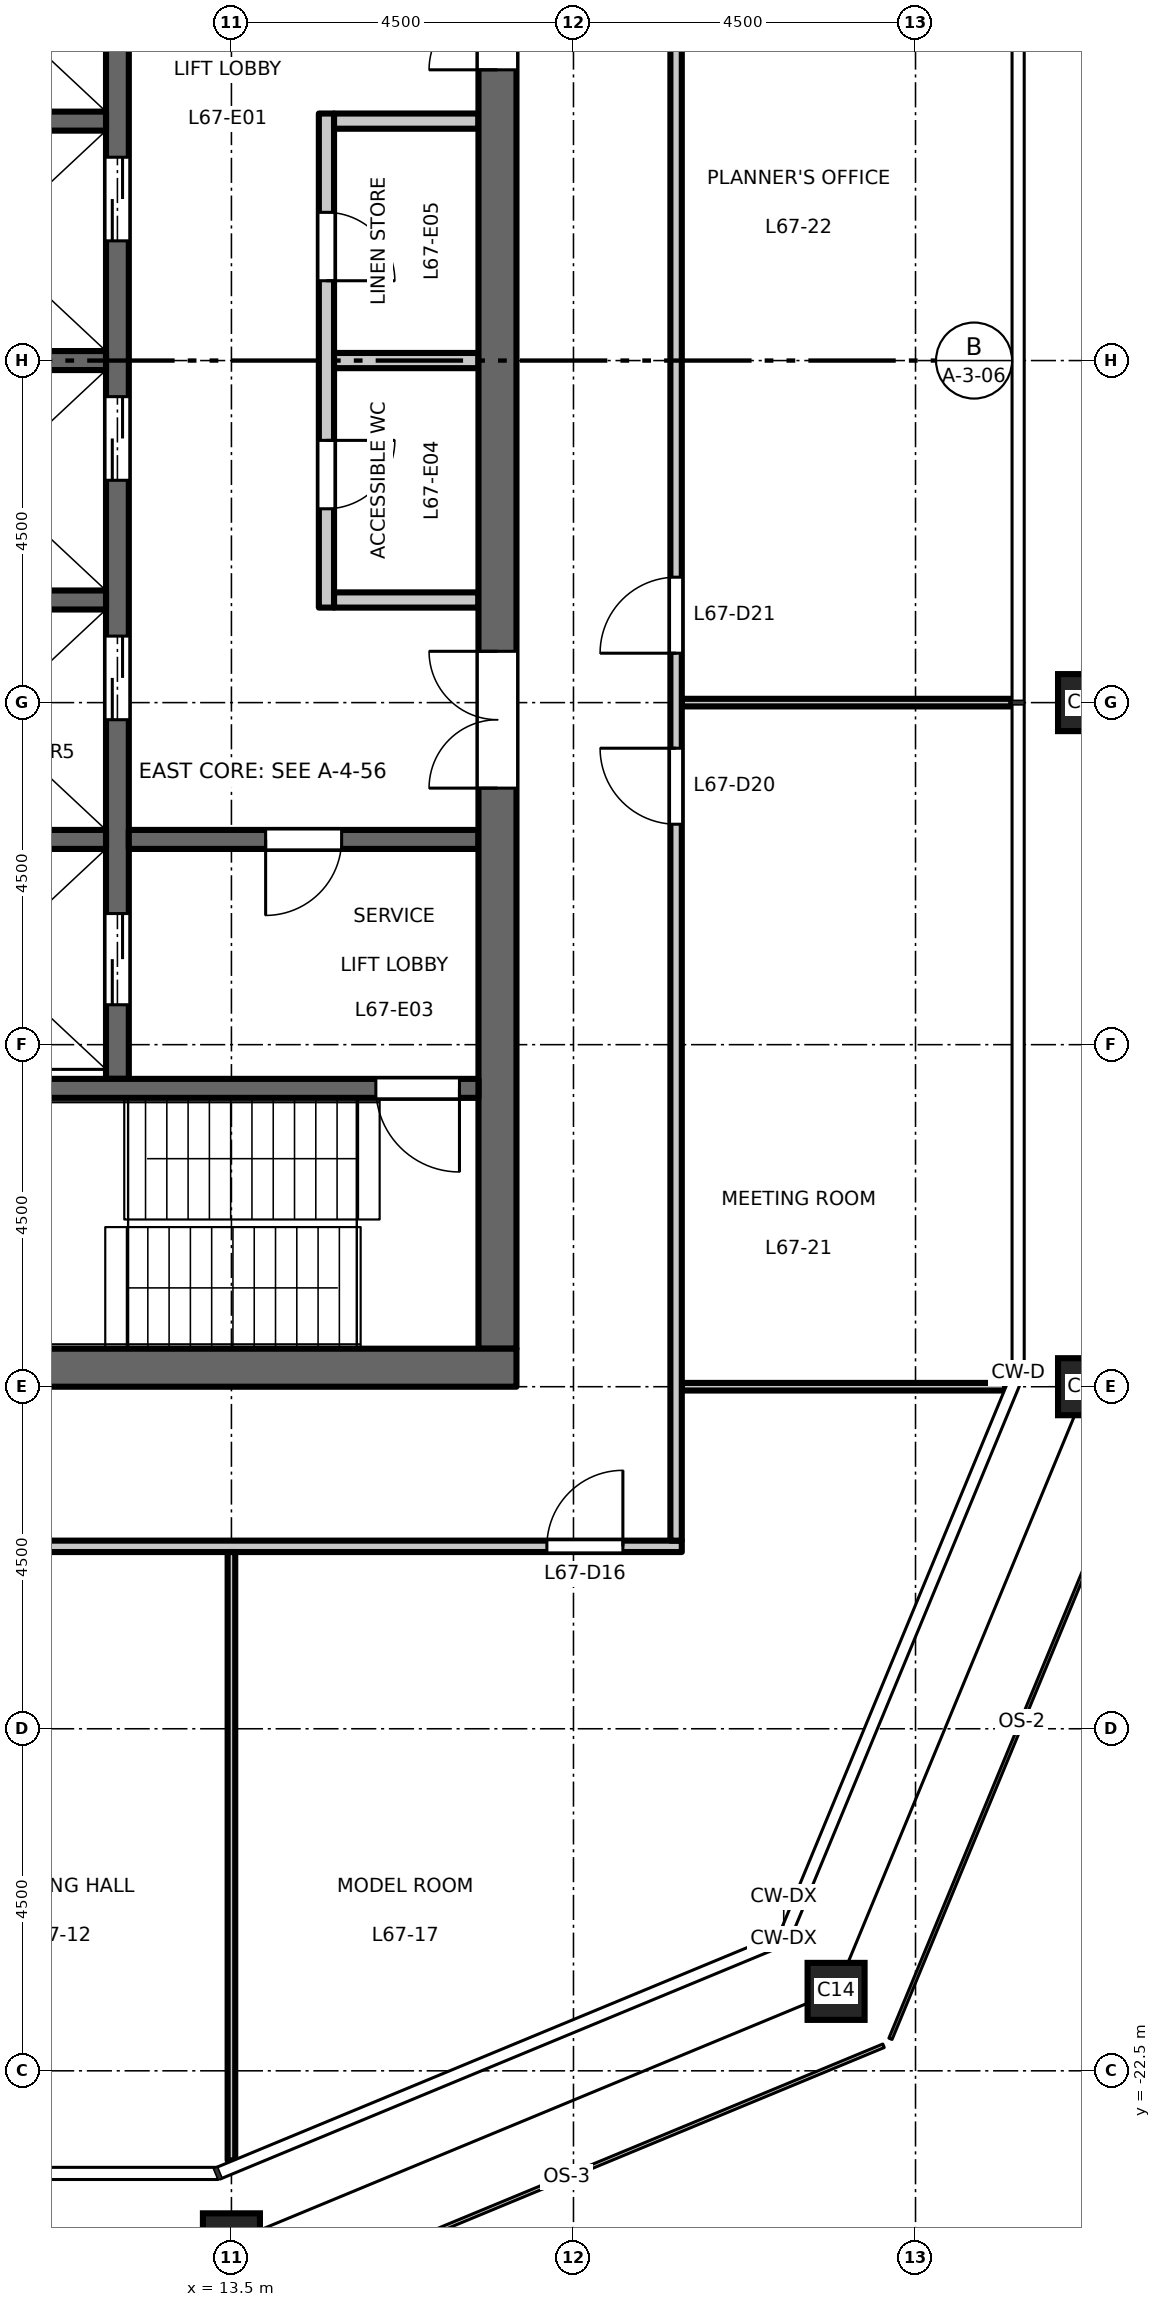
"""IFC4 building model, lengths in metres.
Left out: names, types, materials, properties, quantities, classifications, styles, units other than length and angle.
Written with IfcOpenShell. Run it as: python <this file> out.ifc"""

import sys

from ifc_helpers import new_model, si_unit, direction, frame, frame_2d, origin, origin_2d, place, context, subcontext, project, spatial, rectangle, hollow_rectangle, extrude, element, fill, save


model = new_model("IFC4")
c1 = context("Model", 3, precision=1e-05, world=origin(), true_north=direction((0.0, 1.0)))
c2 = subcontext(c1, "Body", "Model", "MODEL_VIEW")
j1 = project(units=[si_unit("LENGTHUNIT", "METRE"), si_unit("PLANEANGLEUNIT", "RADIAN")], contexts=[c1])
p1 = place(None, origin())
s1 = spatial("IfcSite", under=j1, at=p1, CompositionType="ELEMENT")
p2 = place(p1, origin())
s2 = spatial("IfcBuilding", under=s1, at=p2, CompositionType="ELEMENT")
p3 = place(p2, frame((0.0, 0.0, 312.2)))
s3 = spatial("IfcBuildingStorey", under=s2, at=p3, CompositionType="ELEMENT", Elevation=312.2)
for number, where, z_axis, x_axis in (
    (1, (13.5, -24.75, 0.0), (0.0, 0.0, 1.0), (1.0, 0.0, 0.0)),
    (2, (21.455, -21.455, 0.0), (0.0, 0.0, 1.0), (1.0, 0.0, 0.0)),
    (3, (24.75, -13.5, 0.0), (0.0, 0.0, 1.0), (1.0, 0.0, 0.0)),
    (4, (24.75, -4.5, 0.0), (0.0, 0.0, 1.0), (1.0, 0.0, 0.0)),
):
    element("IfcColumn", number, at=place(p3, frame(where, z_axis=z_axis, x_axis=x_axis)), inside=s3, PredefinedType="COLUMN", context=c2, shape_type="SweptSolid", body=[
        extrude(hollow_rectangle(XDim=0.75, YDim=0.75, WallThickness=0.04, at=origin_2d()), origin(), (0.0, 0.0, 1.0), 4.5),
    ])
p4 = place(p3, frame((14.75, -3.25, 0.0), z_axis=(0.0, 0.0, 1.0), x_axis=(0.0, 1.0, 0.0)))
e5 = element("IfcWall", 5, at=p4, inside=s3, PredefinedType="PARTITIONING", context=c2, shape_type="SweptSolid", body=[
    extrude(rectangle(XDim=6.5, YDim=0.2, at=frame_2d((3.25, 0.0))), origin(), (0.0, 0.0, 1.0), 4.35),
])
p5 = place(p4, frame((1.3, 0.0, 0.0)))
e6 = element("IfcOpeningElement", 6, at=p5, cuts=e5, PredefinedType="OPENING", context=c2, shape_type="SweptSolid", body=[
    extrude(rectangle(XDim=0.9, YDim=2.1, at=frame_2d((0.45, 1.05))), frame((0.0, 0.11, 0.0), z_axis=(0.0, -1.0, 0.0), x_axis=(1.0, 0.0, 0.0)), (0.0, 0.0, 1.0), 0.22),
])
p6 = place(p4, frame((4.3, 0.0, 0.0)))
e7 = element("IfcOpeningElement", 7, at=p6, cuts=e5, PredefinedType="OPENING", context=c2, shape_type="SweptSolid", body=[
    extrude(rectangle(XDim=0.9, YDim=2.1, at=frame_2d((0.45, 1.05))), frame((0.0, 0.11, 0.0), z_axis=(0.0, -1.0, 0.0), x_axis=(1.0, 0.0, 0.0)), (0.0, 0.0, 1.0), 0.22),
])
for number, where, z_axis, x_axis in (
    (8, (14.85, 3.15, 0.0), (0.0, 0.0, 1.0), (1.0, 0.0, 0.0)),
    (9, (14.85, -3.15, 0.0), (0.0, 0.0, 1.0), (1.0, 0.0, 0.0)),
    (10, (14.85, 0.0, 0.0), (0.0, 0.0, 1.0), (1.0, 0.0, 0.0)),
):
    element("IfcWall", number, at=place(p3, frame(where, z_axis=z_axis, x_axis=x_axis)), inside=s3, PredefinedType="PARTITIONING", context=c2, shape_type="SweptSolid", body=[
        extrude(rectangle(XDim=1.9, YDim=0.2, at=frame_2d((0.95, 0.0))), origin(), (0.0, 0.0, 1.0), 4.35),
    ])
p7 = place(p3, frame((12.0, -9.45, 0.0), z_axis=(0.0, 0.0, 1.0), x_axis=(0.0, 1.0, 0.0)))
e11 = element("IfcWall", 11, at=p7, inside=s3, PredefinedType="SHEAR", context=c2, shape_type="SweptSolid", body=[
    extrude(rectangle(XDim=18.9, YDim=0.3, at=frame_2d((9.45, 0.0))), origin(), (0.0, 0.0, 1.0), 4.35),
])
p8 = place(p7, frame((4.725, 0.0, 0.0)))
e12 = element("IfcOpeningElement", 12, at=p8, cuts=e11, PredefinedType="OPENING", context=c2, shape_type="SweptSolid", body=[
    extrude(rectangle(XDim=1.1, YDim=2.1, at=frame_2d((0.55, 1.05))), frame((0.0, 0.16, 0.0), z_axis=(0.0, -1.0, 0.0), x_axis=(1.0, 0.0, 0.0)), (0.0, 0.0, 1.0), 0.32),
])
p9 = place(p7, frame((7.875, 0.0, 0.0)))
e13 = element("IfcOpeningElement", 13, at=p9, cuts=e11, PredefinedType="OPENING", context=c2, shape_type="SweptSolid", body=[
    extrude(rectangle(XDim=1.1, YDim=2.1, at=frame_2d((0.55, 1.05))), frame((0.0, 0.16, 0.0), z_axis=(0.0, -1.0, 0.0), x_axis=(1.0, 0.0, 0.0)), (0.0, 0.0, 1.0), 0.32),
])
p10 = place(p7, frame((11.025, 0.0, 0.0)))
e14 = element("IfcOpeningElement", 14, at=p10, cuts=e11, PredefinedType="OPENING", context=c2, shape_type="SweptSolid", body=[
    extrude(rectangle(XDim=1.1, YDim=2.1, at=frame_2d((0.55, 1.05))), frame((0.0, 0.16, 0.0), z_axis=(0.0, -1.0, 0.0), x_axis=(1.0, 0.0, 0.0)), (0.0, 0.0, 1.0), 0.32),
])
p11 = place(p7, frame((14.175, 0.0, 0.0)))
e15 = element("IfcOpeningElement", 15, at=p11, cuts=e11, PredefinedType="OPENING", context=c2, shape_type="SweptSolid", body=[
    extrude(rectangle(XDim=1.1, YDim=2.1, at=frame_2d((0.55, 1.05))), frame((0.0, 0.16, 0.0), z_axis=(0.0, -1.0, 0.0), x_axis=(1.0, 0.0, 0.0)), (0.0, 0.0, 1.0), 0.32),
])
p12 = place(p7, frame((16.725, 0.0, 0.0)))
e16 = element("IfcOpeningElement", 16, at=p12, cuts=e11, PredefinedType="OPENING", context=c2, shape_type="SweptSolid", body=[
    extrude(rectangle(XDim=1.2, YDim=2.1, at=frame_2d((0.6, 1.05))), frame((0.0, 0.16, 0.0), z_axis=(0.0, -1.0, 0.0), x_axis=(1.0, 0.0, 0.0)), (0.0, 0.0, 1.0), 0.32),
])
p13 = place(p7, frame((0.975, 0.0, 0.0)))
e17 = element("IfcOpeningElement", 17, at=p13, cuts=e11, PredefinedType="OPENING", context=c2, shape_type="SweptSolid", body=[
    extrude(rectangle(XDim=1.2, YDim=2.1, at=frame_2d((0.6, 1.05))), frame((0.0, 0.16, 0.0), z_axis=(0.0, -1.0, 0.0), x_axis=(1.0, 0.0, 0.0)), (0.0, 0.0, 1.0), 0.32),
])
p14 = place(p3, frame((12.15, -6.3, 0.0), z_axis=(0.0, 0.0, 1.0), x_axis=(1.0, 0.0, 0.0)))
e18 = element("IfcWall", 18, at=p14, inside=s3, PredefinedType="SHEAR", context=c2, shape_type="SweptSolid", body=[
    extrude(rectangle(XDim=4.6, YDim=0.25, at=frame_2d((2.3, 0.0))), origin(), (0.0, 0.0, 1.0), 4.35),
])
p15 = place(p14, frame((1.8, 0.0, 0.0)))
e19 = element("IfcOpeningElement", 19, at=p15, cuts=e18, PredefinedType="OPENING", context=c2, shape_type="SweptSolid", body=[
    extrude(rectangle(XDim=1.0, YDim=2.1, at=frame_2d((0.5, 1.05))), frame((0.0, 0.135, 0.0), z_axis=(0.0, -1.0, 0.0), x_axis=(1.0, 0.0, 0.0)), (0.0, 0.0, 1.0), 0.27),
])
p16 = place(p3, frame((17.0, -13.0, 0.0), z_axis=(0.0, 0.0, 1.0), x_axis=(0.0, 1.0, 0.0)))
e20 = element("IfcWall", 20, at=p16, inside=s3, PredefinedType="SHEAR", context=c2, shape_type="SweptSolid", body=[
    extrude(rectangle(XDim=26.0, YDim=0.5, at=frame_2d((13.0, 0.0))), origin(), (0.0, 0.0, 1.0), 4.35),
])
p17 = place(p16, frame((16.825, 0.0, 0.0)))
e21 = element("IfcOpeningElement", 21, at=p17, cuts=e20, PredefinedType="OPENING", context=c2, shape_type="SweptSolid", body=[
    extrude(rectangle(XDim=1.8, YDim=2.1, at=frame_2d((0.9, 1.05))), frame((0.0, 0.26, 0.0), z_axis=(0.0, -1.0, 0.0), x_axis=(1.0, 0.0, 0.0)), (0.0, 0.0, 1.0), 0.52),
])
p18 = place(p16, frame((7.375, 0.0, 0.0)))
e22 = element("IfcOpeningElement", 22, at=p18, cuts=e20, PredefinedType="OPENING", context=c2, shape_type="SweptSolid", body=[
    extrude(rectangle(XDim=1.8, YDim=2.1, at=frame_2d((0.9, 1.05))), frame((0.0, 0.26, 0.0), z_axis=(0.0, -1.0, 0.0), x_axis=(1.0, 0.0, 0.0)), (0.0, 0.0, 1.0), 0.52),
])
for number, where, z_axis, x_axis in (
    (23, (8.75, 0.0, 0.0), (0.0, 0.0, 1.0), (1.0, 0.0, 0.0)),
    (24, (8.75, 3.15, 0.0), (0.0, 0.0, 1.0), (1.0, 0.0, 0.0)),
    (25, (8.75, -3.15, 0.0), (0.0, 0.0, 1.0), (1.0, 0.0, 0.0)),
    (26, (8.75, -6.3, 0.0), (0.0, 0.0, 1.0), (1.0, 0.0, 0.0)),
):
    element("IfcWall", number, at=place(p3, frame(where, z_axis=z_axis, x_axis=x_axis)), inside=s3, PredefinedType="SHEAR", context=c2, shape_type="SweptSolid", body=[
        extrude(rectangle(XDim=3.1, YDim=0.25, at=frame_2d((1.55, 0.0))), origin(), (0.0, 0.0, 1.0), 4.35),
    ])
p19 = place(p3, frame((8.75, -9.575, 0.0), z_axis=(0.0, 0.0, 1.0), x_axis=(1.0, 0.0, 0.0)))
e27 = element("IfcWall", 27, at=p19, inside=s3, PredefinedType="SHEAR", context=c2, shape_type="SweptSolid", body=[
    extrude(rectangle(XDim=8.0, YDim=0.25, at=frame_2d((4.0, 0.0))), origin(), (0.0, 0.0, 1.0), 4.35),
])
p20 = place(p19, frame((6.65, 0.0, 0.0)))
e28 = element("IfcOpeningElement", 28, at=p20, cuts=e27, PredefinedType="OPENING", context=c2, shape_type="SweptSolid", body=[
    extrude(rectangle(XDim=1.1, YDim=2.1, at=frame_2d((0.55, 1.05))), frame((0.0, 0.135, 0.0), z_axis=(0.0, -1.0, 0.0), x_axis=(1.0, 0.0, 0.0)), (0.0, 0.0, 1.0), 0.27),
])
p21 = place(p3, frame((8.25, -13.25, 0.0), z_axis=(0.0, 0.0, 1.0), x_axis=(1.0, 0.0, 0.0)))
e29 = element("IfcWall", 29, at=p21, inside=s3, PredefinedType="SHEAR", context=c2, shape_type="SweptSolid", body=[
    extrude(rectangle(XDim=9.0, YDim=0.5, at=frame_2d((4.5, 0.0))), origin(), (0.0, 0.0, 1.0), 4.35),
])
p22 = place(p3, frame((-19.425, -15.6, 0.0), z_axis=(0.0, 0.0, 1.0), x_axis=(1.0, 0.0, 0.0)))
e30 = element("IfcWall", 30, at=p22, inside=s3, PredefinedType="PARTITIONING", context=c2, shape_type="SweptSolid", body=[
    extrude(rectangle(XDim=38.85, YDim=0.15, at=frame_2d((19.425, 0.0))), origin(), (0.0, 0.0, 1.0), 4.35),
])
p23 = place(p22, frame((6.575, 0.0, 0.0)))
e31 = element("IfcOpeningElement", 31, at=p23, cuts=e30, PredefinedType="OPENING", context=c2, shape_type="SweptSolid", body=[
    extrude(rectangle(XDim=1.0, YDim=2.1, at=frame_2d((0.5, 1.05))), frame((0.0, 0.085, 0.0), z_axis=(0.0, -1.0, 0.0), x_axis=(1.0, 0.0, 0.0)), (0.0, 0.0, 1.0), 0.17),
])
p24 = place(p22, frame((15.575, 0.0, 0.0)))
e32 = element("IfcOpeningElement", 32, at=p24, cuts=e30, PredefinedType="OPENING", context=c2, shape_type="SweptSolid", body=[
    extrude(rectangle(XDim=1.0, YDim=2.1, at=frame_2d((0.5, 1.05))), frame((0.0, 0.085, 0.0), z_axis=(0.0, -1.0, 0.0), x_axis=(1.0, 0.0, 0.0)), (0.0, 0.0, 1.0), 0.17),
])
p25 = place(p22, frame((24.575, 0.0, 0.0)))
e33 = element("IfcOpeningElement", 33, at=p25, cuts=e30, PredefinedType="OPENING", context=c2, shape_type="SweptSolid", body=[
    extrude(rectangle(XDim=1.0, YDim=2.1, at=frame_2d((0.5, 1.05))), frame((0.0, 0.085, 0.0), z_axis=(0.0, -1.0, 0.0), x_axis=(1.0, 0.0, 0.0)), (0.0, 0.0, 1.0), 0.17),
])
p26 = place(p22, frame((0.725, 0.0, 0.0)))
e34 = element("IfcOpeningElement", 34, at=p26, cuts=e30, PredefinedType="OPENING", context=c2, shape_type="SweptSolid", body=[
    extrude(rectangle(XDim=1.0, YDim=2.1, at=frame_2d((0.5, 1.05))), frame((0.0, 0.085, 0.0), z_axis=(0.0, -1.0, 0.0), x_axis=(1.0, 0.0, 0.0)), (0.0, 0.0, 1.0), 0.17),
])
p27 = place(p22, frame((37.075, 0.0, 0.0)))
e35 = element("IfcOpeningElement", 35, at=p27, cuts=e30, PredefinedType="OPENING", context=c2, shape_type="SweptSolid", body=[
    extrude(rectangle(XDim=1.0, YDim=2.1, at=frame_2d((0.5, 1.05))), frame((0.0, 0.085, 0.0), z_axis=(0.0, -1.0, 0.0), x_axis=(1.0, 0.0, 0.0)), (0.0, 0.0, 1.0), 0.17),
])
p28 = place(p3, frame((19.425, -13.5, 0.0), z_axis=(0.0, 0.0, 1.0), x_axis=(1.0, 0.0, 0.0)))
e36 = element("IfcWall", 36, at=p28, inside=s3, PredefinedType="PARTITIONING", context=c2, shape_type="SweptSolid", body=[
    extrude(rectangle(XDim=4.253, YDim=0.1, at=frame_2d((2.126, 0.0))), origin(), (0.0, 0.0, 1.0), 4.35),
])
p29 = place(p3, frame((19.425, -4.5, 0.0), z_axis=(0.0, 0.0, 1.0), x_axis=(1.0, 0.0, 0.0)))
e37 = element("IfcWall", 37, at=p29, inside=s3, PredefinedType="PARTITIONING", context=c2, shape_type="SweptSolid", body=[
    extrude(rectangle(XDim=4.335, YDim=0.1, at=frame_2d((2.167, 0.0))), origin(), (0.0, 0.0, 1.0), 4.35),
])
p30 = place(p3, frame((13.5, -23.678, 0.0), z_axis=(0.0, 0.0, 1.0), x_axis=(0.0, 1.0, 0.0)))
e38 = element("IfcWall", 38, at=p30, inside=s3, PredefinedType="PARTITIONING", context=c2, shape_type="SweptSolid", body=[
    extrude(rectangle(XDim=8.003, YDim=0.1, at=frame_2d((4.001, 0.0))), origin(), (0.0, 0.0, 1.0), 3.75),
])
p31 = place(p3, frame((19.35, -15.525, 0.0), z_axis=(0.0, 0.0, 1.0), x_axis=(0.0, 1.0, 0.0)))
e39 = element("IfcWall", 39, at=p31, inside=s3, PredefinedType="PARTITIONING", context=c2, shape_type="SweptSolid", body=[
    extrude(rectangle(XDim=31.05, YDim=0.15, at=frame_2d((15.525, 0.0))), origin(), (0.0, 0.0, 1.0), 4.35),
])
p32 = place(p31, frame((29.675, 0.0, 0.0)))
e40 = element("IfcOpeningElement", 40, at=p32, cuts=e39, PredefinedType="OPENING", context=c2, shape_type="SweptSolid", body=[
    extrude(rectangle(XDim=1.0, YDim=2.1, at=frame_2d((0.5, 1.05))), frame((0.0, 0.085, 0.0), z_axis=(0.0, -1.0, 0.0), x_axis=(1.0, 0.0, 0.0)), (0.0, 0.0, 1.0), 0.17),
])
p33 = place(p31, frame((9.425, 0.0, 0.0)))
e41 = element("IfcOpeningElement", 41, at=p33, cuts=e39, PredefinedType="OPENING", context=c2, shape_type="SweptSolid", body=[
    extrude(rectangle(XDim=1.0, YDim=2.1, at=frame_2d((0.5, 1.05))), frame((0.0, 0.085, 0.0), z_axis=(0.0, -1.0, 0.0), x_axis=(1.0, 0.0, 0.0)), (0.0, 0.0, 1.0), 0.17),
])
p34 = place(p31, frame((11.675, 0.0, 0.0)))
e42 = element("IfcOpeningElement", 42, at=p34, cuts=e39, PredefinedType="OPENING", context=c2, shape_type="SweptSolid", body=[
    extrude(rectangle(XDim=1.0, YDim=2.1, at=frame_2d((0.5, 1.05))), frame((0.0, 0.085, 0.0), z_axis=(0.0, -1.0, 0.0), x_axis=(1.0, 0.0, 0.0)), (0.0, 0.0, 1.0), 0.17),
])
p35 = place(p31, frame((27.425, 0.0, 0.0)))
e43 = element("IfcOpeningElement", 43, at=p35, cuts=e39, PredefinedType="OPENING", context=c2, shape_type="SweptSolid", body=[
    extrude(rectangle(XDim=1.0, YDim=2.1, at=frame_2d((0.5, 1.05))), frame((0.0, 0.085, 0.0), z_axis=(0.0, -1.0, 0.0), x_axis=(1.0, 0.0, 0.0)), (0.0, 0.0, 1.0), 0.17),
])
p36 = place(p15, origin())
e44 = element("IfcDoor", 44, at=p36, inside=s3, OperationType="SINGLE_SWING_LEFT", PredefinedType="DOOR", context=c2, shape_type="SweptSolid", body=[
    extrude(rectangle(XDim=1.0, YDim=2.1, at=frame_2d((0.5, 1.05))), frame((0.0, 0.025, 0.0), z_axis=(0.0, -1.0, 0.0), x_axis=(1.0, 0.0, 0.0)), (0.0, 0.0, 1.0), 0.05),
])
fill(e19, e44)
p37 = place(p20, origin())
e45 = element("IfcDoor", 45, at=p37, inside=s3, OperationType="SINGLE_SWING_RIGHT", PredefinedType="DOOR", context=c2, shape_type="SweptSolid", body=[
    extrude(rectangle(XDim=1.1, YDim=2.1, at=frame_2d((0.55, 1.05))), frame((0.0, 0.025, 0.0), z_axis=(0.0, -1.0, 0.0), x_axis=(1.0, 0.0, 0.0)), (0.0, 0.0, 1.0), 0.05),
])
fill(e28, e45)
p38 = place(p17, origin())
e46 = element("IfcDoor", 46, at=p38, inside=s3, OperationType="DOUBLE_DOOR_DOUBLE_SWING", PredefinedType="DOOR", context=c2, shape_type="SweptSolid", body=[
    extrude(rectangle(XDim=1.8, YDim=2.1, at=frame_2d((0.9, 1.05))), frame((0.0, 0.025, 0.0), z_axis=(0.0, -1.0, 0.0), x_axis=(1.0, 0.0, 0.0)), (0.0, 0.0, 1.0), 0.05),
])
fill(e21, e46)
p39 = place(p18, origin())
e47 = element("IfcDoor", 47, at=p39, inside=s3, OperationType="DOUBLE_DOOR_DOUBLE_SWING", PredefinedType="DOOR", context=c2, shape_type="SweptSolid", body=[
    extrude(rectangle(XDim=1.8, YDim=2.1, at=frame_2d((0.9, 1.05))), frame((0.0, 0.025, 0.0), z_axis=(0.0, -1.0, 0.0), x_axis=(1.0, 0.0, 0.0)), (0.0, 0.0, 1.0), 0.05),
])
fill(e22, e47)
p40 = place(p8, origin())
e48 = element("IfcDoor", 48, at=p40, inside=s3, OperationType="DOUBLE_DOOR_SLIDING", PredefinedType="DOOR", context=c2, shape_type="SweptSolid", body=[
    extrude(rectangle(XDim=1.1, YDim=2.1, at=frame_2d((0.55, 1.05))), frame((0.0, 0.025, 0.0), z_axis=(0.0, -1.0, 0.0), x_axis=(1.0, 0.0, 0.0)), (0.0, 0.0, 1.0), 0.05),
])
fill(e12, e48)
p41 = place(p9, origin())
e49 = element("IfcDoor", 49, at=p41, inside=s3, OperationType="DOUBLE_DOOR_SLIDING", PredefinedType="DOOR", context=c2, shape_type="SweptSolid", body=[
    extrude(rectangle(XDim=1.1, YDim=2.1, at=frame_2d((0.55, 1.05))), frame((0.0, 0.025, 0.0), z_axis=(0.0, -1.0, 0.0), x_axis=(1.0, 0.0, 0.0)), (0.0, 0.0, 1.0), 0.05),
])
fill(e13, e49)
p42 = place(p10, origin())
e50 = element("IfcDoor", 50, at=p42, inside=s3, OperationType="DOUBLE_DOOR_SLIDING", PredefinedType="DOOR", context=c2, shape_type="SweptSolid", body=[
    extrude(rectangle(XDim=1.1, YDim=2.1, at=frame_2d((0.55, 1.05))), frame((0.0, 0.025, 0.0), z_axis=(0.0, -1.0, 0.0), x_axis=(1.0, 0.0, 0.0)), (0.0, 0.0, 1.0), 0.05),
])
fill(e14, e50)
p43 = place(p13, origin())
e51 = element("IfcDoor", 51, at=p43, inside=s3, OperationType="DOUBLE_DOOR_SLIDING", PredefinedType="DOOR", context=c2, shape_type="SweptSolid", body=[
    extrude(rectangle(XDim=1.2, YDim=2.1, at=frame_2d((0.6, 1.05))), frame((0.0, 0.025, 0.0), z_axis=(0.0, -1.0, 0.0), x_axis=(1.0, 0.0, 0.0)), (0.0, 0.0, 1.0), 0.05),
])
fill(e17, e51)
p44 = place(p5, origin())
e52 = element("IfcDoor", 52, at=p44, inside=s3, OperationType="SINGLE_SWING_RIGHT", PredefinedType="DOOR", context=c2, shape_type="SweptSolid", body=[
    extrude(rectangle(XDim=0.9, YDim=2.1, at=frame_2d((0.45, 1.05))), frame((0.0, 0.025, 0.0), z_axis=(0.0, -1.0, 0.0), x_axis=(1.0, 0.0, 0.0)), (0.0, 0.0, 1.0), 0.05),
])
fill(e6, e52)
p45 = place(p6, origin())
e53 = element("IfcDoor", 53, at=p45, inside=s3, OperationType="SINGLE_SWING_LEFT", PredefinedType="DOOR", context=c2, shape_type="SweptSolid", body=[
    extrude(rectangle(XDim=0.9, YDim=2.1, at=frame_2d((0.45, 1.05))), frame((0.0, 0.025, 0.0), z_axis=(0.0, -1.0, 0.0), x_axis=(1.0, 0.0, 0.0)), (0.0, 0.0, 1.0), 0.05),
])
fill(e7, e53)
p46 = place(p27, origin())
e54 = element("IfcDoor", 54, at=p46, inside=s3, OperationType="SINGLE_SWING_RIGHT", PredefinedType="DOOR", context=c2, shape_type="SweptSolid", body=[
    extrude(rectangle(XDim=1.0, YDim=2.1, at=frame_2d((0.5, 1.05))), frame((0.0, 0.025, 0.0), z_axis=(0.0, -1.0, 0.0), x_axis=(1.0, 0.0, 0.0)), (0.0, 0.0, 1.0), 0.05),
])
fill(e35, e54)
p47 = place(p33, origin())
e55 = element("IfcDoor", 55, at=p47, inside=s3, OperationType="SINGLE_SWING_RIGHT", PredefinedType="DOOR", context=c2, shape_type="SweptSolid", body=[
    extrude(rectangle(XDim=1.0, YDim=2.1, at=frame_2d((0.5, 1.05))), frame((0.0, 0.025, 0.0), z_axis=(0.0, -1.0, 0.0), x_axis=(1.0, 0.0, 0.0)), (0.0, 0.0, 1.0), 0.05),
])
fill(e41, e55)
p48 = place(p34, origin())
e56 = element("IfcDoor", 56, at=p48, inside=s3, OperationType="SINGLE_SWING_LEFT", PredefinedType="DOOR", context=c2, shape_type="SweptSolid", body=[
    extrude(rectangle(XDim=1.0, YDim=2.1, at=frame_2d((0.5, 1.05))), frame((0.0, 0.025, 0.0), z_axis=(0.0, -1.0, 0.0), x_axis=(1.0, 0.0, 0.0)), (0.0, 0.0, 1.0), 0.05),
])
fill(e42, e56)
save(model, sys.argv[1])
